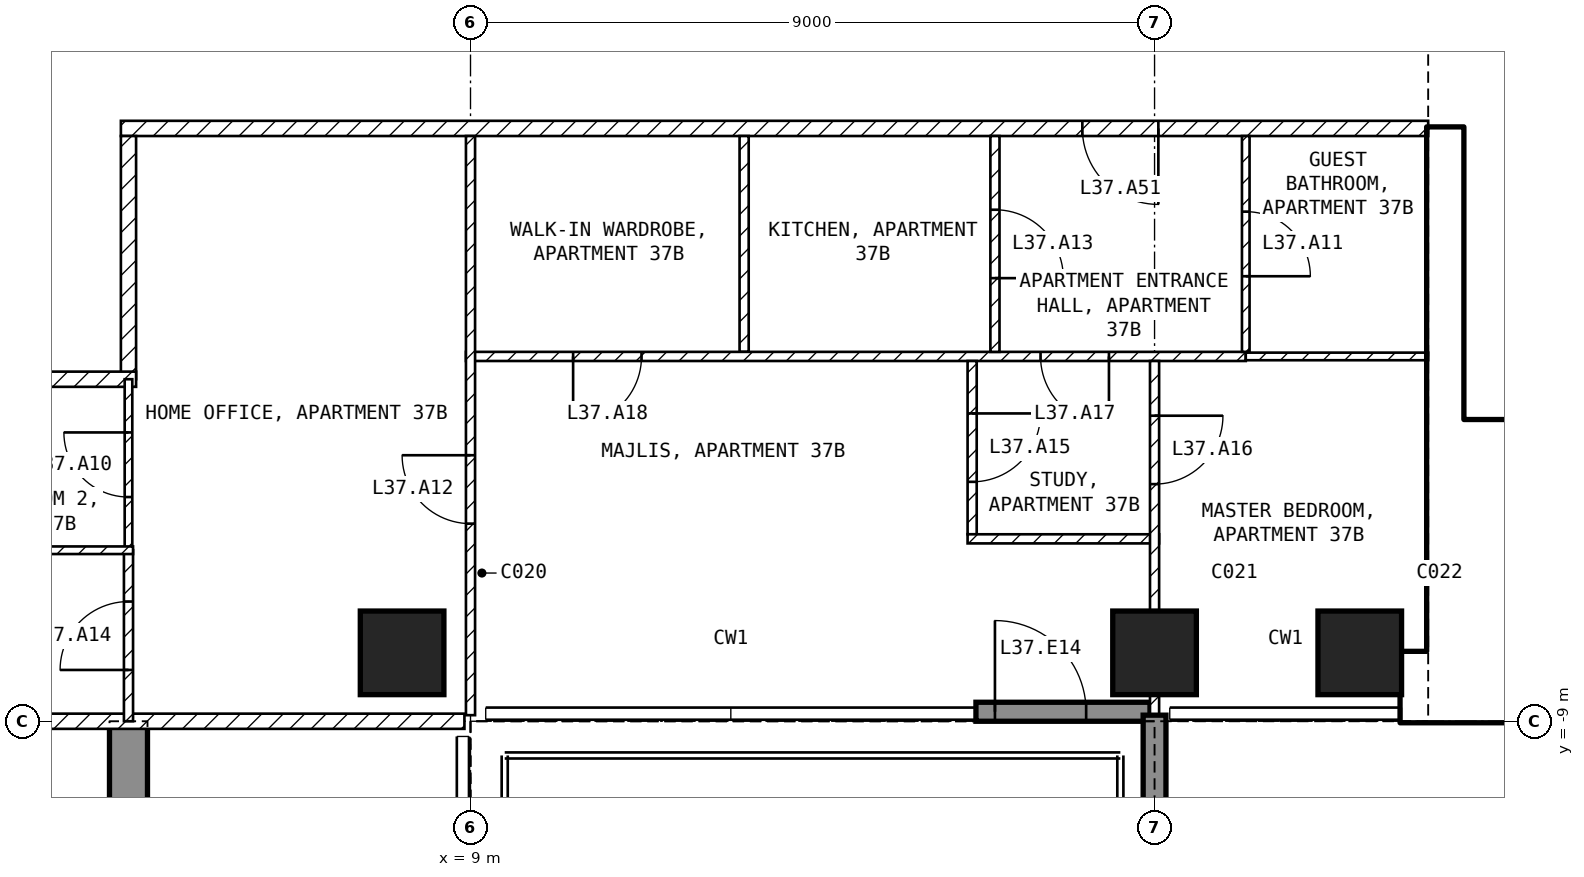
"""IFC4 building model, lengths in metres.
Left out: names, types, materials, properties, quantities, classifications, styles, units other than length and angle.
Written with IfcOpenShell. Run it as: python <this file> out.ifc"""

import sys

from ifc_helpers import new_model, si_unit, direction, frame, frame_2d, origin, origin_2d, place, context, subcontext, project, spatial, polyline, rectangle, outline, extrude, element, fill, save


model = new_model("IFC4")
c1 = context("Model", 3, precision=1e-05, world=origin(), true_north=direction((0.0, 1.0)))
c2 = subcontext(c1, "Body", "Model", "MODEL_VIEW")
j1 = project(units=[si_unit("LENGTHUNIT", "METRE"), si_unit("PLANEANGLEUNIT", "RADIAN")], contexts=[c1])
p1 = place(None, origin())
s1 = spatial("IfcSite", under=j1, at=p1, CompositionType="ELEMENT")
p2 = place(p1, origin())
s2 = spatial("IfcBuilding", under=s1, at=p2, CompositionType="ELEMENT")
p3 = place(p2, frame((0.0, 0.0, 151.4)))
s3 = spatial("IfcBuildingStorey", under=s2, at=p3, CompositionType="ELEMENT", Elevation=151.4)
for number, where, z_axis, x_axis in (
    (1, (8.1, -8.1, -0.25), (0.0, 0.0, 1.0), (1.0, 0.0, 0.0)),
    (2, (18.0, -8.1, -0.25), (0.0, 0.0, 1.0), (1.0, 0.0, 0.0)),
    (3, (20.7, -8.1, -0.25), (0.0, 0.0, 1.0), (1.0, 0.0, 0.0)),
):
    element("IfcColumn", number, at=place(p3, frame(where, z_axis=z_axis, x_axis=x_axis)), inside=s3, PredefinedType="COLUMN", context=c2, shape_type="SweptSolid", body=[
        extrude(rectangle(XDim=1.1, YDim=1.1, at=origin_2d()), origin(), (0.0, 0.0, 1.0), 3.45),
    ])
p4 = place(p3, frame((4.25, -20.15, -0.25), z_axis=(1.0, 0.0, 0.0), x_axis=(0.0, 1.0, 0.0)))
e4 = element("IfcWall", 4, at=p4, inside=s3, PredefinedType="SHEAR", context=c2, shape_type="SweptSolid", body=[
    extrude(outline(polyline([(0.0, 0.0), (6.65, 0.0), (6.65, 2.65), (9.05, 2.65), (9.05, 0.0), (11.15, 0.0), (11.15, 3.45), (0.0, 3.45), (0.0, 0.0)])), origin(), (0.0, 0.0, 1.0), 0.5),
])
p5 = place(p3, frame((15.65, -8.875, 0.0), z_axis=(0.0, 0.0, 1.0), x_axis=(1.0, 0.0, 0.0)))
e5 = element("IfcWall", 5, at=p5, inside=s3, PredefinedType="SOLIDWALL", context=c2, shape_type="SweptSolid", body=[
    extrude(rectangle(XDim=2.29, YDim=0.25, at=frame_2d((1.145, 0.0))), origin(), (0.0, 0.0, 1.0), 3.2),
])
p6 = place(p5, frame((0.25, 0.0, 0.0)))
e6 = element("IfcOpeningElement", 6, at=p6, cuts=e5, PredefinedType="OPENING", context=c2, shape_type="SweptSolid", body=[
    extrude(rectangle(XDim=1.2, YDim=2.4, at=frame_2d((0.6, 1.2))), frame((0.0, 0.135, 0.0), z_axis=(0.0, -1.0, 0.0), x_axis=(1.0, 0.0, 0.0)), (0.0, 0.0, 1.0), 0.27),
])
p7 = place(p3, frame((18.0, -8.92, 0.0), z_axis=(0.0, 0.0, 1.0), x_axis=(0.0, -1.0, 0.0)))
e7 = element("IfcWall", 7, at=p7, inside=s3, PredefinedType="SOLIDWALL", context=c2, shape_type="SweptSolid", body=[
    extrude(rectangle(XDim=2.82, YDim=0.3, at=frame_2d((1.41, 0.0))), origin(), (0.0, 0.0, 1.0), 3.2),
])
p8 = place(p3, frame((21.25, -8.55, 0.0), z_axis=(0.0, 0.0, 1.0), x_axis=(1.0, 0.0, 0.0)))
e8 = element("IfcWall", 8, at=p8, inside=s3, PredefinedType="SHEAR", context=c2, shape_type="SweptSolid", body=[
    extrude(rectangle(XDim=8.95, YDim=0.9, at=frame_2d((4.475, 0.0))), origin(), (0.0, 0.0, 1.0), 3.2),
])
p9 = place(p3, frame((21.825, -8.1, 0.0), z_axis=(0.0, 0.0, 1.0), x_axis=(0.0, 1.0, 0.0)))
e9 = element("IfcWall", 9, at=p9, inside=s3, PredefinedType="SHEAR", context=c2, shape_type="SweptSolid", body=[
    extrude(rectangle(XDim=6.9, YDim=0.45, at=frame_2d((3.45, 0.0))), origin(), (0.0, 0.0, 1.0), 3.2),
])
p10 = place(p3, frame((22.05, -5.15, 0.0), z_axis=(0.0, 0.0, 1.0), x_axis=(1.0, 0.0, 0.0)))
e10 = element("IfcWall", 10, at=p10, inside=s3, PredefinedType="SOLIDWALL", context=c2, shape_type="SweptSolid", body=[
    extrude(rectangle(XDim=6.3, YDim=0.2, at=frame_2d((3.15, 0.0))), origin(), (0.0, 0.0, 1.0), 3.2),
])
p11 = place(p10, frame((0.2, 0.0, 0.0)))
e11 = element("IfcOpeningElement", 11, at=p11, cuts=e10, PredefinedType="OPENING", context=c2, shape_type="SweptSolid", body=[
    extrude(rectangle(XDim=1.0, YDim=2.1, at=frame_2d((0.5, 1.05))), frame((0.0, 0.11, 0.0), z_axis=(0.0, -1.0, 0.0), x_axis=(1.0, 0.0, 0.0)), (0.0, 0.0, 1.0), 0.22),
])
p12 = place(p3, frame((21.6, -1.2, 0.0), z_axis=(0.0, 0.0, 1.0), x_axis=(-1.0, 0.0, 0.0)))
e12 = element("IfcWall", 12, at=p12, inside=s3, PredefinedType="PARTITIONING", context=c2, shape_type="SweptSolid", body=[
    extrude(rectangle(XDim=17.2, YDim=0.2, at=frame_2d((8.6, 0.0))), origin(), (0.0, 0.0, 1.0), 3.2),
])
p13 = place(p12, frame((3.55, 0.0, 0.0)))
e13 = element("IfcOpeningElement", 13, at=p13, cuts=e12, PredefinedType="OPENING", context=c2, shape_type="SweptSolid", body=[
    extrude(rectangle(XDim=1.0, YDim=2.1, at=frame_2d((0.5, 1.05))), frame((0.0, 0.11, 0.0), z_axis=(0.0, -1.0, 0.0), x_axis=(1.0, 0.0, 0.0)), (0.0, 0.0, 1.0), 0.22),
])
p14 = place(p3, frame((4.5, -1.3, 0.0), z_axis=(0.0, 0.0, 1.0), x_axis=(0.0, -1.0, 0.0)))
e14 = element("IfcWall", 14, at=p14, inside=s3, PredefinedType="PARTITIONING", context=c2, shape_type="SweptSolid", body=[
    extrude(rectangle(XDim=3.2, YDim=0.2, at=frame_2d((1.6, 0.0))), origin(), (0.0, 0.0, 1.0), 3.2),
])
p15 = place(p3, frame((4.6, -4.5, 0.0), z_axis=(0.0, 0.0, 1.0), x_axis=(-1.0, 0.0, 0.0)))
e15 = element("IfcWall", 15, at=p15, inside=s3, PredefinedType="PARTITIONING", context=c2, shape_type="SweptSolid", body=[
    extrude(rectangle(XDim=3.5, YDim=0.2, at=frame_2d((1.75, 0.0))), origin(), (0.0, 0.0, 1.0), 3.2),
])
p16 = place(p3, frame((8.92, -9.0, 0.0), z_axis=(0.0, 0.0, 1.0), x_axis=(-1.0, 0.0, 0.0)))
e16 = element("IfcWall", 16, at=p16, inside=s3, PredefinedType="PARTITIONING", context=c2, shape_type="SweptSolid", body=[
    extrude(rectangle(XDim=17.84, YDim=0.2, at=frame_2d((8.92, 0.0))), origin(), (0.0, 0.0, 1.0), 3.2),
])
p17 = place(p16, frame((8.42, 0.0, 0.0)))
e17 = element("IfcOpeningElement", 17, at=p17, cuts=e16, PredefinedType="OPENING", context=c2, shape_type="SweptSolid", body=[
    extrude(rectangle(XDim=1.0, YDim=2.1, at=frame_2d((0.5, 1.05))), frame((0.0, 0.11, 0.0), z_axis=(0.0, -1.0, 0.0), x_axis=(1.0, 0.0, 0.0)), (0.0, 0.0, 1.0), 0.22),
])
p18 = place(p3, frame((12.6, -1.3, 0.0), z_axis=(0.0, 0.0, 1.0), x_axis=(0.0, -1.0, 0.0)))
e18 = element("IfcWall", 18, at=p18, inside=s3, PredefinedType="PARTITIONING", context=c2, shape_type="SweptSolid", body=[
    extrude(rectangle(XDim=2.84, YDim=0.12, at=frame_2d((1.42, 0.0))), origin(), (0.0, 0.0, 1.0), 3.2),
])
p19 = place(p3, frame((19.2, -4.2, 0.0), z_axis=(0.0, 0.0, 1.0), x_axis=(-1.0, 0.0, 0.0)))
e19 = element("IfcWall", 19, at=p19, inside=s3, PredefinedType="PARTITIONING", context=c2, shape_type="SweptSolid", body=[
    extrude(rectangle(XDim=10.26, YDim=0.12, at=frame_2d((5.13, 0.0))), origin(), (0.0, 0.0, 1.0), 3.2),
])
p20 = place(p19, frame((1.8, 0.0, 0.0)))
e20 = element("IfcOpeningElement", 20, at=p20, cuts=e19, PredefinedType="OPENING", context=c2, shape_type="SweptSolid", body=[
    extrude(rectangle(XDim=0.9, YDim=2.1, at=frame_2d((0.45, 1.05))), frame((0.0, 0.07, 0.0), z_axis=(0.0, -1.0, 0.0), x_axis=(1.0, 0.0, 0.0)), (0.0, 0.0, 1.0), 0.14),
])
p21 = place(p19, frame((7.95, 0.0, 0.0)))
e21 = element("IfcOpeningElement", 21, at=p21, cuts=e19, PredefinedType="OPENING", context=c2, shape_type="SweptSolid", body=[
    extrude(rectangle(XDim=0.9, YDim=2.1, at=frame_2d((0.45, 1.05))), frame((0.0, 0.07, 0.0), z_axis=(0.0, -1.0, 0.0), x_axis=(1.0, 0.0, 0.0)), (0.0, 0.0, 1.0), 0.14),
])
p22 = place(p3, frame((9.0, -8.92, 0.0), z_axis=(0.0, 0.0, 1.0), x_axis=(0.0, 1.0, 0.0)))
e22 = element("IfcWall", 22, at=p22, inside=s3, PredefinedType="PARTITIONING", context=c2, shape_type="SweptSolid", body=[
    extrude(rectangle(XDim=7.62, YDim=0.12, at=frame_2d((3.81, 0.0))), origin(), (0.0, 0.0, 1.0), 3.2),
])
p23 = place(p22, frame((2.52, 0.0, 0.0)))
e23 = element("IfcOpeningElement", 23, at=p23, cuts=e22, PredefinedType="OPENING", context=c2, shape_type="SweptSolid", body=[
    extrude(rectangle(XDim=0.9, YDim=2.1, at=frame_2d((0.45, 1.05))), frame((0.0, 0.07, 0.0), z_axis=(0.0, -1.0, 0.0), x_axis=(1.0, 0.0, 0.0)), (0.0, 0.0, 1.0), 0.14),
])
p24 = place(p3, frame((15.9, -1.3, 0.0), z_axis=(0.0, 0.0, 1.0), x_axis=(0.0, -1.0, 0.0)))
e24 = element("IfcWall", 24, at=p24, inside=s3, PredefinedType="PARTITIONING", context=c2, shape_type="SweptSolid", body=[
    extrude(rectangle(XDim=2.84, YDim=0.12, at=frame_2d((1.42, 0.0))), origin(), (0.0, 0.0, 1.0), 3.2),
])
p25 = place(p24, frame((0.97, 0.0, 0.0)))
e25 = element("IfcOpeningElement", 25, at=p25, cuts=e24, PredefinedType="OPENING", context=c2, shape_type="SweptSolid", body=[
    extrude(rectangle(XDim=0.9, YDim=2.1, at=frame_2d((0.45, 1.05))), frame((0.0, 0.07, 0.0), z_axis=(0.0, -1.0, 0.0), x_axis=(1.0, 0.0, 0.0)), (0.0, 0.0, 1.0), 0.14),
])
p26 = place(p3, frame((19.2, -1.3, 0.0), z_axis=(0.0, 0.0, 1.0), x_axis=(0.0, -1.0, 0.0)))
e26 = element("IfcWall", 26, at=p26, inside=s3, PredefinedType="PARTITIONING", context=c2, shape_type="SweptSolid", body=[
    extrude(rectangle(XDim=2.84, YDim=0.1, at=frame_2d((1.42, 0.0))), origin(), (0.0, 0.0, 1.0), 3.2),
])
p27 = place(p26, frame((0.995, 0.0, 0.0)))
e27 = element("IfcOpeningElement", 27, at=p27, cuts=e26, PredefinedType="OPENING", context=c2, shape_type="SweptSolid", body=[
    extrude(rectangle(XDim=0.85, YDim=2.1, at=frame_2d((0.425, 1.05))), frame((0.0, 0.06, 0.0), z_axis=(0.0, -1.0, 0.0), x_axis=(1.0, 0.0, 0.0)), (0.0, 0.0, 1.0), 0.12),
])
p28 = place(p3, frame((21.6, -4.2, 0.0), z_axis=(0.0, 0.0, 1.0), x_axis=(-1.0, 0.0, 0.0)))
e28 = element("IfcWall", 28, at=p28, inside=s3, PredefinedType="PARTITIONING", context=c2, shape_type="SweptSolid", body=[
    extrude(rectangle(XDim=2.4, YDim=0.1, at=frame_2d((1.2, 0.0))), origin(), (0.0, 0.0, 1.0), 3.2),
])
p29 = place(p3, frame((15.6, -4.26, 0.0), z_axis=(0.0, 0.0, 1.0), x_axis=(0.0, -1.0, 0.0)))
e29 = element("IfcWall", 29, at=p29, inside=s3, PredefinedType="PARTITIONING", context=c2, shape_type="SweptSolid", body=[
    extrude(rectangle(XDim=2.28, YDim=0.12, at=frame_2d((1.14, 0.0))), origin(), (0.0, 0.0, 1.0), 3.2),
])
p30 = place(p29, frame((0.69, 0.0, 0.0)))
e30 = element("IfcOpeningElement", 30, at=p30, cuts=e29, PredefinedType="OPENING", context=c2, shape_type="SweptSolid", body=[
    extrude(rectangle(XDim=0.9, YDim=2.1, at=frame_2d((0.45, 1.05))), frame((0.0, 0.07, 0.0), z_axis=(0.0, -1.0, 0.0), x_axis=(1.0, 0.0, 0.0)), (0.0, 0.0, 1.0), 0.14),
])
p31 = place(p3, frame((15.54, -6.6, 0.0), z_axis=(0.0, 0.0, 1.0), x_axis=(1.0, 0.0, 0.0)))
e31 = element("IfcWall", 31, at=p31, inside=s3, PredefinedType="PARTITIONING", context=c2, shape_type="SweptSolid", body=[
    extrude(rectangle(XDim=2.52, YDim=0.12, at=frame_2d((1.26, 0.0))), origin(), (0.0, 0.0, 1.0), 3.2),
])
p32 = place(p3, frame((18.0, -4.26, 0.0), z_axis=(0.0, 0.0, 1.0), x_axis=(0.0, -1.0, 0.0)))
e32 = element("IfcWall", 32, at=p32, inside=s3, PredefinedType="PARTITIONING", context=c2, shape_type="SweptSolid", body=[
    extrude(rectangle(XDim=4.66, YDim=0.12, at=frame_2d((2.33, 0.0))), origin(), (0.0, 0.0, 1.0), 2.364),
])
p33 = place(p32, frame((0.72, 0.0, 0.0)))
e33 = element("IfcOpeningElement", 33, at=p33, cuts=e32, PredefinedType="OPENING", context=c2, shape_type="SweptSolid", body=[
    extrude(rectangle(XDim=0.9, YDim=2.1, at=frame_2d((0.45, 1.05))), frame((0.0, 0.07, 0.0), z_axis=(0.0, -1.0, 0.0), x_axis=(1.0, 0.0, 0.0)), (0.0, 0.0, 1.0), 0.14),
])
p34 = place(p3, frame((4.5, -6.75, 0.0), z_axis=(0.0, 0.0, 1.0), x_axis=(0.0, 1.0, 0.0)))
e34 = element("IfcWall", 34, at=p34, inside=s3, PredefinedType="PARTITIONING", context=c2, shape_type="SweptSolid", body=[
    extrude(rectangle(XDim=2.25, YDim=0.1, at=frame_2d((1.125, 0.0))), origin(), (0.0, 0.0, 1.0), 3.2),
])
p35 = place(p34, frame((0.7, 0.0, 0.0)))
e35 = element("IfcOpeningElement", 35, at=p35, cuts=e34, PredefinedType="OPENING", context=c2, shape_type="SweptSolid", body=[
    extrude(rectangle(XDim=0.85, YDim=2.1, at=frame_2d((0.425, 1.05))), frame((0.0, 0.06, 0.0), z_axis=(0.0, -1.0, 0.0), x_axis=(1.0, 0.0, 0.0)), (0.0, 0.0, 1.0), 0.12),
])
p36 = place(p3, frame((4.5, -9.0, 0.0), z_axis=(0.0, 0.0, 1.0), x_axis=(0.0, 1.0, 0.0)))
e36 = element("IfcWall", 36, at=p36, inside=s3, PredefinedType="PARTITIONING", context=c2, shape_type="SweptSolid", body=[
    extrude(rectangle(XDim=2.25, YDim=0.12, at=frame_2d((1.125, 0.0))), origin(), (0.0, 0.0, 1.0), 3.2),
])
p37 = place(p36, frame((0.675, 0.0, 0.0)))
e37 = element("IfcOpeningElement", 37, at=p37, cuts=e36, PredefinedType="OPENING", context=c2, shape_type="SweptSolid", body=[
    extrude(rectangle(XDim=0.9, YDim=2.1, at=frame_2d((0.45, 1.05))), frame((0.0, 0.07, 0.0), z_axis=(0.0, -1.0, 0.0), x_axis=(1.0, 0.0, 0.0)), (0.0, 0.0, 1.0), 0.14),
])
p38 = place(p3, frame((4.56, -6.75, 0.0), z_axis=(0.0, 0.0, 1.0), x_axis=(-1.0, 0.0, 0.0)))
e38 = element("IfcWall", 38, at=p38, inside=s3, PredefinedType="PARTITIONING", context=c2, shape_type="SweptSolid", body=[
    extrude(rectangle(XDim=3.46, YDim=0.1, at=frame_2d((1.73, 0.0))), origin(), (0.0, 0.0, 1.0), 3.2),
])
p39 = place(p6, origin())
e39 = element("IfcDoor", 39, at=p39, inside=s3, OperationType="SINGLE_SWING_LEFT", PredefinedType="DOOR", context=c2, shape_type="SweptSolid", body=[
    extrude(rectangle(XDim=1.2, YDim=2.4, at=frame_2d((0.6, 1.2))), frame((0.0, 0.025, 0.0), z_axis=(0.0, -1.0, 0.0), x_axis=(1.0, 0.0, 0.0)), (0.0, 0.0, 1.0), 0.05),
])
fill(e6, e39)
p40 = place(p11, origin())
e40 = element("IfcDoor", 40, at=p40, inside=s3, OperationType="SINGLE_SWING_LEFT", PredefinedType="DOOR", context=c2, shape_type="SweptSolid", body=[
    extrude(rectangle(XDim=1.0, YDim=2.1, at=frame_2d((0.5, 1.05))), frame((0.0, 0.025, 0.0), z_axis=(0.0, -1.0, 0.0), x_axis=(1.0, 0.0, 0.0)), (0.0, 0.0, 1.0), 0.05),
])
fill(e11, e40)
p41 = place(p35, origin())
e41 = element("IfcDoor", 41, at=p41, inside=s3, OperationType="SINGLE_SWING_RIGHT", PredefinedType="DOOR", context=c2, shape_type="SweptSolid", body=[
    extrude(rectangle(XDim=0.85, YDim=2.1, at=frame_2d((0.425, 1.05))), frame((0.0, 0.025, 0.0), z_axis=(0.0, -1.0, 0.0), x_axis=(1.0, 0.0, 0.0)), (0.0, 0.0, 1.0), 0.05),
])
fill(e35, e41)
p42 = place(p27, origin())
e42 = element("IfcDoor", 42, at=p42, inside=s3, OperationType="SINGLE_SWING_RIGHT", PredefinedType="DOOR", context=c2, shape_type="SweptSolid", body=[
    extrude(rectangle(XDim=0.85, YDim=2.1, at=frame_2d((0.425, 1.05))), frame((0.0, 0.025, 0.0), z_axis=(0.0, -1.0, 0.0), x_axis=(1.0, 0.0, 0.0)), (0.0, 0.0, 1.0), 0.05),
])
fill(e27, e42)
p43 = place(p23, origin())
e43 = element("IfcDoor", 43, at=p43, inside=s3, OperationType="SINGLE_SWING_RIGHT", PredefinedType="DOOR", context=c2, shape_type="SweptSolid", body=[
    extrude(rectangle(XDim=0.9, YDim=2.1, at=frame_2d((0.45, 1.05))), frame((0.0, 0.025, 0.0), z_axis=(0.0, -1.0, 0.0), x_axis=(1.0, 0.0, 0.0)), (0.0, 0.0, 1.0), 0.05),
])
fill(e23, e43)
p44 = place(p25, origin())
e44 = element("IfcDoor", 44, at=p44, inside=s3, OperationType="SINGLE_SWING_RIGHT", PredefinedType="DOOR", context=c2, shape_type="SweptSolid", body=[
    extrude(rectangle(XDim=0.9, YDim=2.1, at=frame_2d((0.45, 1.05))), frame((0.0, 0.025, 0.0), z_axis=(0.0, -1.0, 0.0), x_axis=(1.0, 0.0, 0.0)), (0.0, 0.0, 1.0), 0.05),
])
fill(e25, e44)
p45 = place(p37, origin())
e45 = element("IfcDoor", 45, at=p45, inside=s3, OperationType="SINGLE_SWING_LEFT", PredefinedType="DOOR", context=c2, shape_type="SweptSolid", body=[
    extrude(rectangle(XDim=0.9, YDim=2.1, at=frame_2d((0.45, 1.05))), frame((0.0, 0.025, 0.0), z_axis=(0.0, -1.0, 0.0), x_axis=(1.0, 0.0, 0.0)), (0.0, 0.0, 1.0), 0.05),
])
fill(e37, e45)
p46 = place(p30, origin())
e46 = element("IfcDoor", 46, at=p46, inside=s3, OperationType="SINGLE_SWING_LEFT", PredefinedType="DOOR", context=c2, shape_type="SweptSolid", body=[
    extrude(rectangle(XDim=0.9, YDim=2.1, at=frame_2d((0.45, 1.05))), frame((0.0, 0.025, 0.0), z_axis=(0.0, -1.0, 0.0), x_axis=(1.0, 0.0, 0.0)), (0.0, 0.0, 1.0), 0.05),
])
fill(e30, e46)
p47 = place(p33, origin())
e47 = element("IfcDoor", 47, at=p47, inside=s3, OperationType="SINGLE_SWING_LEFT", PredefinedType="DOOR", context=c2, shape_type="SweptSolid", body=[
    extrude(rectangle(XDim=0.9, YDim=2.1, at=frame_2d((0.45, 1.05))), frame((0.0, 0.025, 0.0), z_axis=(0.0, -1.0, 0.0), x_axis=(1.0, 0.0, 0.0)), (0.0, 0.0, 1.0), 0.05),
])
fill(e33, e47)
p48 = place(p20, origin())
e48 = element("IfcDoor", 48, at=p48, inside=s3, OperationType="SINGLE_SWING_LEFT", PredefinedType="DOOR", context=c2, shape_type="SweptSolid", body=[
    extrude(rectangle(XDim=0.9, YDim=2.1, at=frame_2d((0.45, 1.05))), frame((0.0, 0.025, 0.0), z_axis=(0.0, -1.0, 0.0), x_axis=(1.0, 0.0, 0.0)), (0.0, 0.0, 1.0), 0.05),
])
fill(e20, e48)
p49 = place(p21, origin())
e49 = element("IfcDoor", 49, at=p49, inside=s3, OperationType="SINGLE_SWING_RIGHT", PredefinedType="DOOR", context=c2, shape_type="SweptSolid", body=[
    extrude(rectangle(XDim=0.9, YDim=2.1, at=frame_2d((0.45, 1.05))), frame((0.0, 0.025, 0.0), z_axis=(0.0, -1.0, 0.0), x_axis=(1.0, 0.0, 0.0)), (0.0, 0.0, 1.0), 0.05),
])
fill(e21, e49)
p50 = place(p13, origin())
e50 = element("IfcDoor", 50, at=p50, inside=s3, OperationType="SINGLE_SWING_LEFT", PredefinedType="DOOR", context=c2, shape_type="SweptSolid", body=[
    extrude(rectangle(XDim=1.0, YDim=2.1, at=frame_2d((0.5, 1.05))), frame((0.0, 0.025, 0.0), z_axis=(0.0, -1.0, 0.0), x_axis=(1.0, 0.0, 0.0)), (0.0, 0.0, 1.0), 0.05),
])
fill(e13, e50)
save(model, sys.argv[1])
